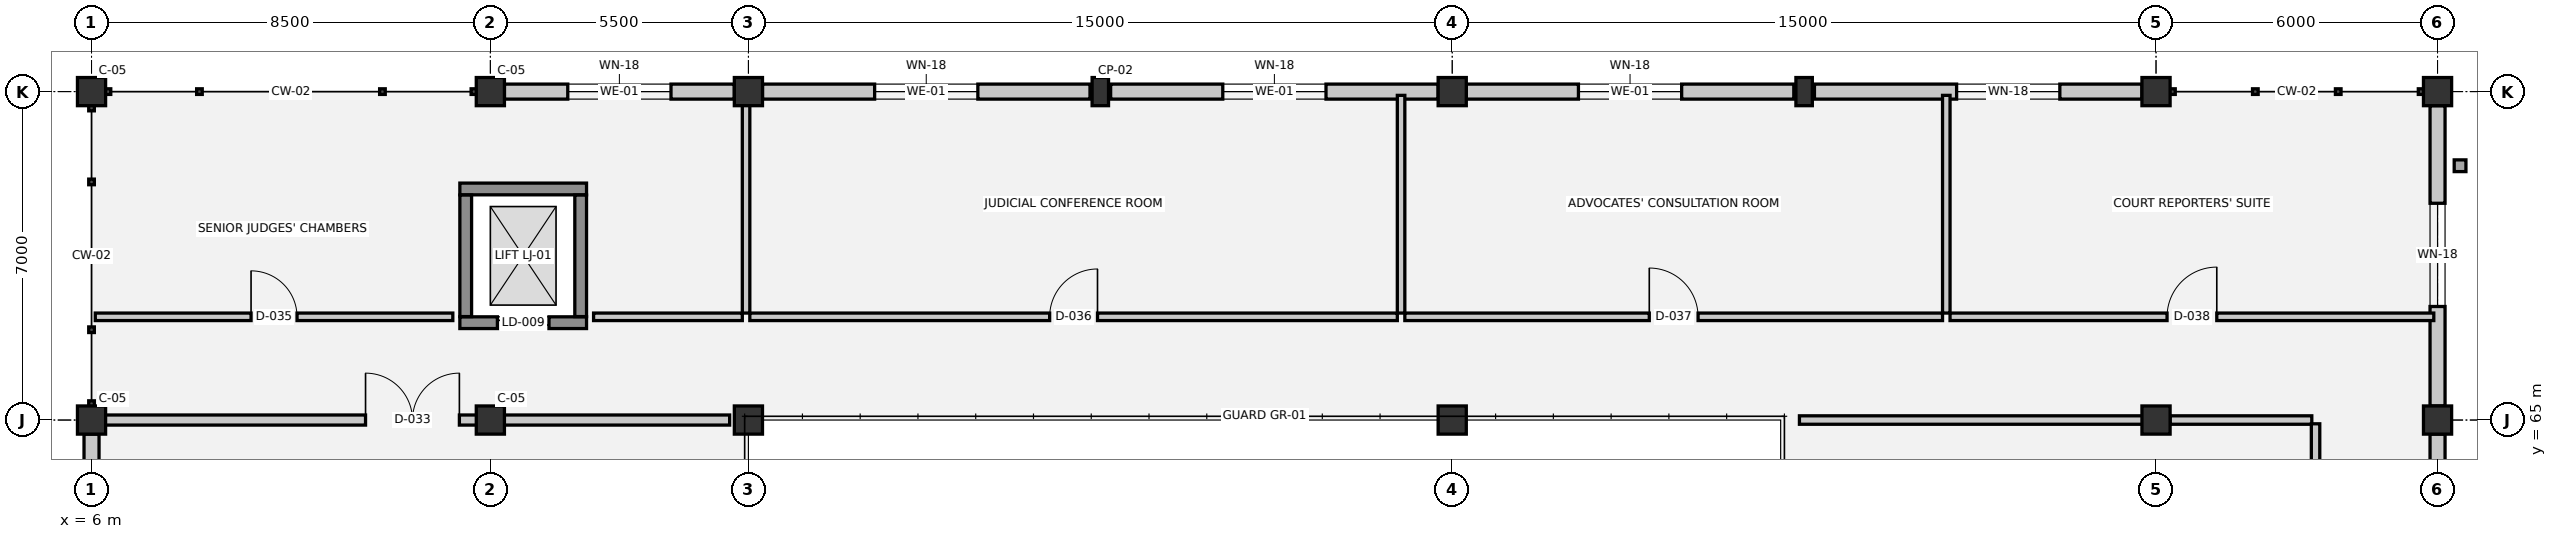
"""IFC4 building model, lengths in metres.
Left out: names, types, materials, properties, quantities, classifications, styles, units other than length and angle.
Written with IfcOpenShell. Run it as: python <this file> out.ifc"""

import sys

from ifc_helpers import new_model, si_unit, direction, frame, frame_2d, origin, origin_2d, place, context, subcontext, project, spatial, rectangle, extrude, element, fill, save


model = new_model("IFC4")
c1 = context("Model", 3, precision=1e-05, world=origin(), true_north=direction((0.0, 1.0)))
c2 = subcontext(c1, "Body", "Model", "MODEL_VIEW")
j1 = project(units=[si_unit("LENGTHUNIT", "METRE"), si_unit("PLANEANGLEUNIT", "RADIAN")], contexts=[c1])
p1 = place(None, origin())
s1 = spatial("IfcSite", under=j1, at=p1, CompositionType="ELEMENT")
p2 = place(p1, origin())
s2 = spatial("IfcBuilding", under=s1, at=p2, CompositionType="ELEMENT")
p3 = place(p2, frame((0.0, 0.0, 9.9)))
s3 = spatial("IfcBuildingStorey", under=s2, at=p3, CompositionType="ELEMENT", Elevation=9.9)
for number, where, z_axis, x_axis in (
    (1, (6.0, 65.0, 0.0), (0.0, 0.0, 1.0), (1.0, 0.0, 0.0)),
    (2, (6.0, 72.0, 0.0), (0.0, 0.0, 1.0), (1.0, 0.0, 0.0)),
    (3, (14.5, 65.0, 0.0), (0.0, 0.0, 1.0), (1.0, 0.0, 0.0)),
    (4, (14.5, 72.0, 0.0), (0.0, 0.0, 1.0), (1.0, 0.0, 0.0)),
    (5, (20.0, 65.0, 0.0), (0.0, 0.0, 1.0), (1.0, 0.0, 0.0)),
    (6, (20.0, 72.0, 0.0), (0.0, 0.0, 1.0), (1.0, 0.0, 0.0)),
    (7, (35.0, 65.0, 0.0), (0.0, 0.0, 1.0), (1.0, 0.0, 0.0)),
    (8, (35.0, 72.0, 0.0), (0.0, 0.0, 1.0), (1.0, 0.0, 0.0)),
    (9, (50.0, 65.0, 0.0), (0.0, 0.0, 1.0), (1.0, 0.0, 0.0)),
    (10, (50.0, 72.0, 0.0), (0.0, 0.0, 1.0), (1.0, 0.0, 0.0)),
    (11, (56.0, 65.0, 0.0), (0.0, 0.0, 1.0), (1.0, 0.0, 0.0)),
    (12, (56.0, 72.0, 0.0), (0.0, 0.0, 1.0), (1.0, 0.0, 0.0)),
):
    element("IfcColumn", number, at=place(p3, frame(where, z_axis=z_axis, x_axis=x_axis)), inside=s3, PredefinedType="COLUMN", context=c2, shape_type="SweptSolid", body=[
        extrude(rectangle(XDim=0.6, YDim=0.6, at=origin_2d()), origin(), (0.0, 0.0, 1.0), 4.5),
    ])
for number, where, z_axis, x_axis in (
    (13, (27.5, 72.0, 0.0), (0.0, 0.0, 1.0), (1.0, 0.0, 0.0)),
    (14, (42.5, 72.0, 0.0), (0.0, 0.0, 1.0), (1.0, 0.0, 0.0)),
):
    element("IfcColumn", number, at=place(p3, frame(where, z_axis=z_axis, x_axis=x_axis)), inside=s3, PredefinedType="PILASTER", context=c2, shape_type="SweptSolid", body=[
        extrude(rectangle(XDim=0.35, YDim=0.6, at=origin_2d()), origin(), (0.0, 0.0, 1.0), 4.5),
    ])
p4 = place(p3, frame((6.0, 51.3, 0.0), z_axis=(0.0, 0.0, 1.0), x_axis=(0.0, 1.0, 0.0)))
e15 = element("IfcWall", 15, at=p4, inside=s3, PredefinedType="SOLIDWALL", context=c2, shape_type="SweptSolid", body=[
    extrude(rectangle(XDim=13.4, YDim=0.32, at=frame_2d((6.7, 0.0))), origin(), (0.0, 0.0, 1.0), 3.11),
])
p5 = place(p4, frame((5.6, 0.0, 0.9)))
e16 = element("IfcOpeningElement", 16, at=p5, cuts=e15, PredefinedType="OPENING", context=c2, shape_type="SweptSolid", body=[
    extrude(rectangle(XDim=2.2, YDim=1.0, at=frame_2d((1.1, 0.5))), frame((0.0, 0.17, 0.0), z_axis=(0.0, -1.0, 0.0), x_axis=(1.0, 0.0, 0.0)), (0.0, 0.0, 1.0), 0.34),
])
p6 = place(p3, frame((14.8, 72.0, 0.0), z_axis=(0.0, 0.0, 1.0), x_axis=(1.0, 0.0, 0.0)))
e17 = element("IfcWall", 17, at=p6, inside=s3, PredefinedType="SOLIDWALL", context=c2, shape_type="SweptSolid", body=[
    extrude(rectangle(XDim=4.9, YDim=0.32, at=frame_2d((2.45, 0.0))), origin(), (0.0, 0.0, 1.0), 3.11),
])
p7 = place(p6, frame((1.35, 0.0, 0.9)))
e18 = element("IfcOpeningElement", 18, at=p7, cuts=e17, PredefinedType="OPENING", context=c2, shape_type="SweptSolid", body=[
    extrude(rectangle(XDim=2.2, YDim=1.0, at=frame_2d((1.1, 0.5))), frame((0.0, 0.17, 0.0), z_axis=(0.0, -1.0, 0.0), x_axis=(1.0, 0.0, 0.0)), (0.0, 0.0, 1.0), 0.34),
])
p8 = place(p3, frame((20.3, 72.0, 0.0), z_axis=(0.0, 0.0, 1.0), x_axis=(1.0, 0.0, 0.0)))
e19 = element("IfcWall", 19, at=p8, inside=s3, PredefinedType="SOLIDWALL", context=c2, shape_type="SweptSolid", body=[
    extrude(rectangle(XDim=6.98, YDim=0.32, at=frame_2d((3.49, 0.0))), origin(), (0.0, 0.0, 1.0), 3.11),
])
p9 = place(p8, frame((2.39, 0.0, 0.9)))
e20 = element("IfcOpeningElement", 20, at=p9, cuts=e19, PredefinedType="OPENING", context=c2, shape_type="SweptSolid", body=[
    extrude(rectangle(XDim=2.2, YDim=1.0, at=frame_2d((1.1, 0.5))), frame((0.0, 0.17, 0.0), z_axis=(0.0, -1.0, 0.0), x_axis=(1.0, 0.0, 0.0)), (0.0, 0.0, 1.0), 0.34),
])
p10 = place(p3, frame((27.72, 72.0, 0.0), z_axis=(0.0, 0.0, 1.0), x_axis=(1.0, 0.0, 0.0)))
e21 = element("IfcWall", 21, at=p10, inside=s3, PredefinedType="SOLIDWALL", context=c2, shape_type="SweptSolid", body=[
    extrude(rectangle(XDim=6.98, YDim=0.32, at=frame_2d((3.49, 0.0))), origin(), (0.0, 0.0, 1.0), 3.11),
])
p11 = place(p10, frame((2.39, 0.0, 0.9)))
e22 = element("IfcOpeningElement", 22, at=p11, cuts=e21, PredefinedType="OPENING", context=c2, shape_type="SweptSolid", body=[
    extrude(rectangle(XDim=2.2, YDim=1.0, at=frame_2d((1.1, 0.5))), frame((0.0, 0.17, 0.0), z_axis=(0.0, -1.0, 0.0), x_axis=(1.0, 0.0, 0.0)), (0.0, 0.0, 1.0), 0.34),
])
p12 = place(p3, frame((35.3, 72.0, 0.0), z_axis=(0.0, 0.0, 1.0), x_axis=(1.0, 0.0, 0.0)))
e23 = element("IfcWall", 23, at=p12, inside=s3, PredefinedType="SOLIDWALL", context=c2, shape_type="SweptSolid", body=[
    extrude(rectangle(XDim=6.98, YDim=0.32, at=frame_2d((3.49, 0.0))), origin(), (0.0, 0.0, 1.0), 3.11),
])
p13 = place(p12, frame((2.39, 0.0, 0.9)))
e24 = element("IfcOpeningElement", 24, at=p13, cuts=e23, PredefinedType="OPENING", context=c2, shape_type="SweptSolid", body=[
    extrude(rectangle(XDim=2.2, YDim=1.0, at=frame_2d((1.1, 0.5))), frame((0.0, 0.17, 0.0), z_axis=(0.0, -1.0, 0.0), x_axis=(1.0, 0.0, 0.0)), (0.0, 0.0, 1.0), 0.34),
])
p14 = place(p3, frame((42.72, 72.0, 0.0), z_axis=(0.0, 0.0, 1.0), x_axis=(1.0, 0.0, 0.0)))
e25 = element("IfcWall", 25, at=p14, inside=s3, PredefinedType="SOLIDWALL", context=c2, shape_type="SweptSolid", body=[
    extrude(rectangle(XDim=6.98, YDim=0.32, at=frame_2d((3.49, 0.0))), origin(), (0.0, 0.0, 1.0), 3.11),
])
p15 = place(p14, frame((3.03, 0.0, 0.9)))
e26 = element("IfcOpeningElement", 26, at=p15, cuts=e25, PredefinedType="OPENING", context=c2, shape_type="SweptSolid", body=[
    extrude(rectangle(XDim=2.2, YDim=1.0, at=frame_2d((1.1, 0.5))), frame((0.0, 0.17, 0.0), z_axis=(0.0, -1.0, 0.0), x_axis=(1.0, 0.0, 0.0)), (0.0, 0.0, 1.0), 0.34),
])
p16 = place(p3, frame((56.0, 71.7, 0.0), z_axis=(0.0, 0.0, 1.0), x_axis=(0.0, -1.0, 0.0)))
e27 = element("IfcWall", 27, at=p16, inside=s3, PredefinedType="SOLIDWALL", context=c2, shape_type="SweptSolid", body=[
    extrude(rectangle(XDim=6.4, YDim=0.32, at=frame_2d((3.2, 0.0))), origin(), (0.0, 0.0, 1.0), 3.11),
])
p17 = place(p16, frame((2.08, 0.0, 0.9)))
e28 = element("IfcOpeningElement", 28, at=p17, cuts=e27, PredefinedType="OPENING", context=c2, shape_type="SweptSolid", body=[
    extrude(rectangle(XDim=2.2, YDim=1.0, at=frame_2d((1.1, 0.5))), frame((0.0, 0.17, 0.0), z_axis=(0.0, -1.0, 0.0), x_axis=(1.0, 0.0, 0.0)), (0.0, 0.0, 1.0), 0.34),
])
p18 = place(p3, frame((56.0, 64.7, 0.0), z_axis=(0.0, 0.0, 1.0), x_axis=(0.0, -1.0, 0.0)))
e29 = element("IfcWall", 29, at=p18, inside=s3, PredefinedType="SOLIDWALL", context=c2, shape_type="SweptSolid", body=[
    extrude(rectangle(XDim=13.4, YDim=0.32, at=frame_2d((6.7, 0.0))), origin(), (0.0, 0.0, 1.0), 3.11),
])
p19 = place(p18, frame((9.975, 0.0, 0.0)))
e30 = element("IfcOpeningElement", 30, at=p19, cuts=e29, PredefinedType="OPENING", context=c2, shape_type="SweptSolid", body=[
    extrude(rectangle(XDim=1.65, YDim=2.2, at=frame_2d((0.825, 1.1))), frame((0.0, 0.17, 0.0), z_axis=(0.0, -1.0, 0.0), x_axis=(1.0, 0.0, 0.0)), (0.0, 0.0, 1.0), 0.34),
])
p20 = place(p3, frame((13.85, 67.075, 0.0), z_axis=(0.0, 0.0, 1.0), x_axis=(1.0, 0.0, 0.0)))
e31 = element("IfcWall", 31, at=p20, inside=s3, PredefinedType="SHEAR", context=c2, shape_type="SweptSolid", body=[
    extrude(rectangle(XDim=2.7, YDim=0.25, at=frame_2d((1.35, 0.0))), origin(), (0.0, 0.0, 1.0), 4.5),
])
p21 = place(p20, frame((0.8, 0.0, 0.0)))
e32 = element("IfcOpeningElement", 32, at=p21, cuts=e31, PredefinedType="OPENING", context=c2, shape_type="SweptSolid", body=[
    extrude(rectangle(XDim=1.1, YDim=2.15, at=frame_2d((0.55, 1.075))), frame((0.0, 0.135, 0.0), z_axis=(0.0, -1.0, 0.0), x_axis=(1.0, 0.0, 0.0)), (0.0, 0.0, 1.0), 0.27),
])
p22 = place(p3, frame((16.55, 69.925, 0.0), z_axis=(0.0, 0.0, 1.0), x_axis=(-1.0, 0.0, 0.0)))
e33 = element("IfcWall", 33, at=p22, inside=s3, PredefinedType="SHEAR", context=c2, shape_type="SweptSolid", body=[
    extrude(rectangle(XDim=2.7, YDim=0.25, at=frame_2d((1.35, 0.0))), origin(), (0.0, 0.0, 1.0), 4.5),
])
for number, where, z_axis, x_axis in (
    (34, (13.975, 69.795, 0.0), (0.0, 0.0, 1.0), (0.0, -1.0, 0.0)),
    (35, (16.425, 67.205, 0.0), (0.0, 0.0, 1.0), (0.0, 1.0, 0.0)),
):
    element("IfcWall", number, at=place(p3, frame(where, z_axis=z_axis, x_axis=x_axis)), inside=s3, PredefinedType="SHEAR", context=c2, shape_type="SweptSolid", body=[
        extrude(rectangle(XDim=2.59, YDim=0.25, at=frame_2d((1.295, 0.0))), origin(), (0.0, 0.0, 1.0), 4.5),
    ])
p23 = place(p3, frame((6.08, 65.0, 0.0), z_axis=(0.0, 0.0, 1.0), x_axis=(1.0, 0.0, 0.0)))
e36 = element("IfcWall", 36, at=p23, inside=s3, PredefinedType="PARTITIONING", context=c2, shape_type="SweptSolid", body=[
    extrude(rectangle(XDim=13.52, YDim=0.215, at=frame_2d((6.76, 0.0))), origin(), (0.0, 0.0, 1.0), 3.53),
])
p24 = place(p23, frame((5.76, 0.0, 0.0)))
e37 = element("IfcOpeningElement", 37, at=p24, cuts=e36, PredefinedType="OPENING", context=c2, shape_type="SweptSolid", body=[
    extrude(rectangle(XDim=2.0, YDim=2.35, at=frame_2d((1.0, 1.175))), frame((0.0, 0.117, 0.0), z_axis=(0.0, -1.0, 0.0), x_axis=(1.0, 0.0, 0.0)), (0.0, 0.0, 1.0), 0.235),
])
p25 = place(p3, frame((42.4, 65.0, 0.0), z_axis=(0.0, 0.0, 1.0), x_axis=(1.0, 0.0, 0.0)))
e38 = element("IfcWall", 38, at=p25, inside=s3, PredefinedType="PARTITIONING", context=c2, shape_type="SweptSolid", body=[
    extrude(rectangle(XDim=7.9, YDim=0.18, at=frame_2d((3.95, 0.0))), origin(), (0.0, 0.0, 1.0), 3.28),
])
p26 = place(p3, frame((50.3, 65.0, 0.0), z_axis=(0.0, 0.0, 1.0), x_axis=(1.0, 0.0, 0.0)))
e39 = element("IfcWall", 39, at=p26, inside=s3, PredefinedType="PARTITIONING", context=c2, shape_type="SweptSolid", body=[
    extrude(rectangle(XDim=3.02, YDim=0.18, at=frame_2d((1.51, 0.0))), origin(), (0.0, 0.0, 1.0), 3.53),
])
p27 = place(p3, frame((6.08, 67.2, 0.0), z_axis=(0.0, 0.0, 1.0), x_axis=(1.0, 0.0, 0.0)))
e40 = element("IfcWall", 40, at=p27, inside=s3, PredefinedType="PARTITIONING", context=c2, shape_type="SweptSolid", body=[
    extrude(rectangle(XDim=7.62, YDim=0.16, at=frame_2d((3.81, 0.0))), origin(), (0.0, 0.0, 1.0), 4.14),
])
p28 = place(p27, frame((3.32, 0.0, 0.0)))
e41 = element("IfcOpeningElement", 41, at=p28, cuts=e40, PredefinedType="OPENING", context=c2, shape_type="SweptSolid", body=[
    extrude(rectangle(XDim=0.98, YDim=2.1, at=frame_2d((0.49, 1.05))), frame((0.0, 0.09, 0.0), z_axis=(0.0, -1.0, 0.0), x_axis=(1.0, 0.0, 0.0)), (0.0, 0.0, 1.0), 0.18),
])
p29 = place(p3, frame((16.7, 67.2, 0.0), z_axis=(0.0, 0.0, 1.0), x_axis=(1.0, 0.0, 0.0)))
e42 = element("IfcWall", 42, at=p29, inside=s3, PredefinedType="PARTITIONING", context=c2, shape_type="SweptSolid", body=[
    extrude(rectangle(XDim=3.17, YDim=0.16, at=frame_2d((1.585, 0.0))), origin(), (0.0, 0.0, 1.0), 4.14),
])
p30 = place(p3, frame((20.03, 67.2, 0.0), z_axis=(0.0, 0.0, 1.0), x_axis=(1.0, 0.0, 0.0)))
e43 = element("IfcWall", 43, at=p30, inside=s3, PredefinedType="PARTITIONING", context=c2, shape_type="SweptSolid", body=[
    extrude(rectangle(XDim=13.8, YDim=0.16, at=frame_2d((6.9, 0.0))), origin(), (0.0, 0.0, 1.0), 4.14),
])
p31 = place(p30, frame((6.39, 0.0, 0.0)))
e44 = element("IfcOpeningElement", 44, at=p31, cuts=e43, PredefinedType="OPENING", context=c2, shape_type="SweptSolid", body=[
    extrude(rectangle(XDim=1.02, YDim=2.15, at=frame_2d((0.51, 1.075))), frame((0.0, 0.09, 0.0), z_axis=(0.0, -1.0, 0.0), x_axis=(1.0, 0.0, 0.0)), (0.0, 0.0, 1.0), 0.18),
])
p32 = place(p3, frame((33.99, 67.2, 0.0), z_axis=(0.0, 0.0, 1.0), x_axis=(1.0, 0.0, 0.0)))
e45 = element("IfcWall", 45, at=p32, inside=s3, PredefinedType="PARTITIONING", context=c2, shape_type="SweptSolid", body=[
    extrude(rectangle(XDim=11.46, YDim=0.16, at=frame_2d((5.73, 0.0))), origin(), (0.0, 0.0, 1.0), 4.14),
])
p33 = place(p32, frame((5.21, 0.0, 0.0)))
e46 = element("IfcOpeningElement", 46, at=p33, cuts=e45, PredefinedType="OPENING", context=c2, shape_type="SweptSolid", body=[
    extrude(rectangle(XDim=1.04, YDim=2.15, at=frame_2d((0.52, 1.075))), frame((0.0, 0.09, 0.0), z_axis=(0.0, -1.0, 0.0), x_axis=(1.0, 0.0, 0.0)), (0.0, 0.0, 1.0), 0.18),
])
p34 = place(p3, frame((45.61, 67.2, 0.0), z_axis=(0.0, 0.0, 1.0), x_axis=(1.0, 0.0, 0.0)))
e47 = element("IfcWall", 47, at=p34, inside=s3, PredefinedType="PARTITIONING", context=c2, shape_type="SweptSolid", body=[
    extrude(rectangle(XDim=10.31, YDim=0.16, at=frame_2d((5.155, 0.0))), origin(), (0.0, 0.0, 1.0), 4.14),
])
p35 = place(p34, frame((4.625, 0.0, 0.0)))
e48 = element("IfcOpeningElement", 48, at=p35, cuts=e47, PredefinedType="OPENING", context=c2, shape_type="SweptSolid", body=[
    extrude(rectangle(XDim=1.06, YDim=2.2, at=frame_2d((0.53, 1.1))), frame((0.0, 0.09, 0.0), z_axis=(0.0, -1.0, 0.0), x_axis=(1.0, 0.0, 0.0)), (0.0, 0.0, 1.0), 0.18),
])
p36 = place(p3, frame((19.95, 67.28, 0.0), z_axis=(0.0, 0.0, 1.0), x_axis=(0.0, 1.0, 0.0)))
e49 = element("IfcWall", 49, at=p36, inside=s3, PredefinedType="PARTITIONING", context=c2, shape_type="SweptSolid", body=[
    extrude(rectangle(XDim=4.64, YDim=0.16, at=frame_2d((2.32, 0.0))), origin(), (0.0, 0.0, 1.0), 3.58),
])
for number, where, z_axis, x_axis in (
    (50, (33.91, 67.28, 0.0), (0.0, 0.0, 1.0), (0.0, 1.0, 0.0)),
    (51, (45.53, 67.28, 0.0), (0.0, 0.0, 1.0), (0.0, 1.0, 0.0)),
):
    element("IfcWall", number, at=place(p3, frame(where, z_axis=z_axis, x_axis=x_axis)), inside=s3, PredefinedType="PARTITIONING", context=c2, shape_type="SweptSolid", body=[
        extrude(rectangle(XDim=4.64, YDim=0.16, at=frame_2d((2.32, 0.0))), origin(), (0.0, 0.0, 1.0), 4.14),
    ])
p37 = place(p3, frame((53.4, 51.08, 0.0), z_axis=(0.0, 0.0, 1.0), x_axis=(0.0, 1.0, 0.0)))
e52 = element("IfcWall", 52, at=p37, inside=s3, PredefinedType="PARTITIONING", context=c2, shape_type="SweptSolid", body=[
    extrude(rectangle(XDim=13.84, YDim=0.18, at=frame_2d((6.92, 0.0))), origin(), (0.0, 0.0, 1.0), 4.14),
])
p38 = place(p37, frame((6.345, 0.0, 0.0)))
e53 = element("IfcOpeningElement", 53, at=p38, cuts=e52, PredefinedType="OPENING", context=c2, shape_type="SweptSolid", body=[
    extrude(rectangle(XDim=1.15, YDim=2.2, at=frame_2d((0.575, 1.1))), frame((0.0, 0.1, 0.0), z_axis=(0.0, -1.0, 0.0), x_axis=(1.0, 0.0, 0.0)), (0.0, 0.0, 1.0), 0.2),
])
p39 = place(p7, origin())
e54 = element("IfcWindow", 54, at=p39, inside=s3, PartitioningType="SINGLE_PANEL", PredefinedType="WINDOW", context=c2, shape_type="SweptSolid", body=[
    extrude(rectangle(XDim=2.2, YDim=1.0, at=frame_2d((1.1, 0.5))), frame((0.0, 0.03, 0.0), z_axis=(0.0, -1.0, 0.0), x_axis=(1.0, 0.0, 0.0)), (0.0, 0.0, 1.0), 0.06),
])
fill(e18, e54)
p40 = place(p9, origin())
e55 = element("IfcWindow", 55, at=p40, inside=s3, PartitioningType="SINGLE_PANEL", PredefinedType="WINDOW", context=c2, shape_type="SweptSolid", body=[
    extrude(rectangle(XDim=2.2, YDim=1.0, at=frame_2d((1.1, 0.5))), frame((0.0, 0.03, 0.0), z_axis=(0.0, -1.0, 0.0), x_axis=(1.0, 0.0, 0.0)), (0.0, 0.0, 1.0), 0.06),
])
fill(e20, e55)
p41 = place(p11, origin())
e56 = element("IfcWindow", 56, at=p41, inside=s3, PartitioningType="SINGLE_PANEL", PredefinedType="WINDOW", context=c2, shape_type="SweptSolid", body=[
    extrude(rectangle(XDim=2.2, YDim=1.0, at=frame_2d((1.1, 0.5))), frame((0.0, 0.03, 0.0), z_axis=(0.0, -1.0, 0.0), x_axis=(1.0, 0.0, 0.0)), (0.0, 0.0, 1.0), 0.06),
])
fill(e22, e56)
p42 = place(p13, origin())
e57 = element("IfcWindow", 57, at=p42, inside=s3, PartitioningType="SINGLE_PANEL", PredefinedType="WINDOW", context=c2, shape_type="SweptSolid", body=[
    extrude(rectangle(XDim=2.2, YDim=1.0, at=frame_2d((1.1, 0.5))), frame((0.0, 0.03, 0.0), z_axis=(0.0, -1.0, 0.0), x_axis=(1.0, 0.0, 0.0)), (0.0, 0.0, 1.0), 0.06),
])
fill(e24, e57)
p43 = place(p15, origin())
e58 = element("IfcWindow", 58, at=p43, inside=s3, PartitioningType="SINGLE_PANEL", PredefinedType="WINDOW", context=c2, shape_type="SweptSolid", body=[
    extrude(rectangle(XDim=2.2, YDim=1.0, at=frame_2d((1.1, 0.5))), frame((0.0, 0.03, 0.0), z_axis=(0.0, -1.0, 0.0), x_axis=(1.0, 0.0, 0.0)), (0.0, 0.0, 1.0), 0.06),
])
fill(e26, e58)
p44 = place(p17, origin())
e59 = element("IfcWindow", 59, at=p44, inside=s3, PartitioningType="SINGLE_PANEL", PredefinedType="WINDOW", context=c2, shape_type="SweptSolid", body=[
    extrude(rectangle(XDim=2.2, YDim=1.0, at=frame_2d((1.1, 0.5))), frame((0.0, 0.03, 0.0), z_axis=(0.0, -1.0, 0.0), x_axis=(1.0, 0.0, 0.0)), (0.0, 0.0, 1.0), 0.06),
])
fill(e28, e59)
p45 = place(p21, origin())
e60 = element("IfcDoor", 60, at=p45, inside=s3, OperationType="DOUBLE_DOOR_SLIDING", PredefinedType="DOOR", context=c2, shape_type="SweptSolid", body=[
    extrude(rectangle(XDim=1.1, YDim=2.15, at=frame_2d((0.55, 1.075))), frame((0.0, 0.025, 0.0), z_axis=(0.0, -1.0, 0.0), x_axis=(1.0, 0.0, 0.0)), (0.0, 0.0, 1.0), 0.05),
])
fill(e32, e60)
p46 = place(p24, origin())
e61 = element("IfcDoor", 61, at=p46, inside=s3, OperationType="DOUBLE_DOOR_SINGLE_SWING", PredefinedType="DOOR", context=c2, shape_type="SweptSolid", body=[
    extrude(rectangle(XDim=2.0, YDim=2.35, at=frame_2d((1.0, 1.175))), frame((0.0, 0.025, 0.0), z_axis=(0.0, -1.0, 0.0), x_axis=(1.0, 0.0, 0.0)), (0.0, 0.0, 1.0), 0.05),
])
fill(e37, e61)
p47 = place(p28, origin())
e62 = element("IfcDoor", 62, at=p47, inside=s3, OperationType="SINGLE_SWING_LEFT", PredefinedType="DOOR", context=c2, shape_type="SweptSolid", body=[
    extrude(rectangle(XDim=0.98, YDim=2.1, at=frame_2d((0.49, 1.05))), frame((0.0, 0.025, 0.0), z_axis=(0.0, -1.0, 0.0), x_axis=(1.0, 0.0, 0.0)), (0.0, 0.0, 1.0), 0.05),
])
fill(e41, e62)
p48 = place(p31, origin())
e63 = element("IfcDoor", 63, at=p48, inside=s3, OperationType="SINGLE_SWING_RIGHT", PredefinedType="DOOR", context=c2, shape_type="SweptSolid", body=[
    extrude(rectangle(XDim=1.02, YDim=2.15, at=frame_2d((0.51, 1.075))), frame((0.0, 0.025, 0.0), z_axis=(0.0, -1.0, 0.0), x_axis=(1.0, 0.0, 0.0)), (0.0, 0.0, 1.0), 0.05),
])
fill(e44, e63)
p49 = place(p33, origin())
e64 = element("IfcDoor", 64, at=p49, inside=s3, OperationType="SINGLE_SWING_LEFT", PredefinedType="DOOR", context=c2, shape_type="SweptSolid", body=[
    extrude(rectangle(XDim=1.04, YDim=2.15, at=frame_2d((0.52, 1.075))), frame((0.0, 0.025, 0.0), z_axis=(0.0, -1.0, 0.0), x_axis=(1.0, 0.0, 0.0)), (0.0, 0.0, 1.0), 0.05),
])
fill(e46, e64)
p50 = place(p35, origin())
e65 = element("IfcDoor", 65, at=p50, inside=s3, OperationType="SINGLE_SWING_RIGHT", PredefinedType="DOOR", context=c2, shape_type="SweptSolid", body=[
    extrude(rectangle(XDim=1.06, YDim=2.2, at=frame_2d((0.53, 1.1))), frame((0.0, 0.025, 0.0), z_axis=(0.0, -1.0, 0.0), x_axis=(1.0, 0.0, 0.0)), (0.0, 0.0, 1.0), 0.05),
])
fill(e48, e65)
save(model, sys.argv[1])
